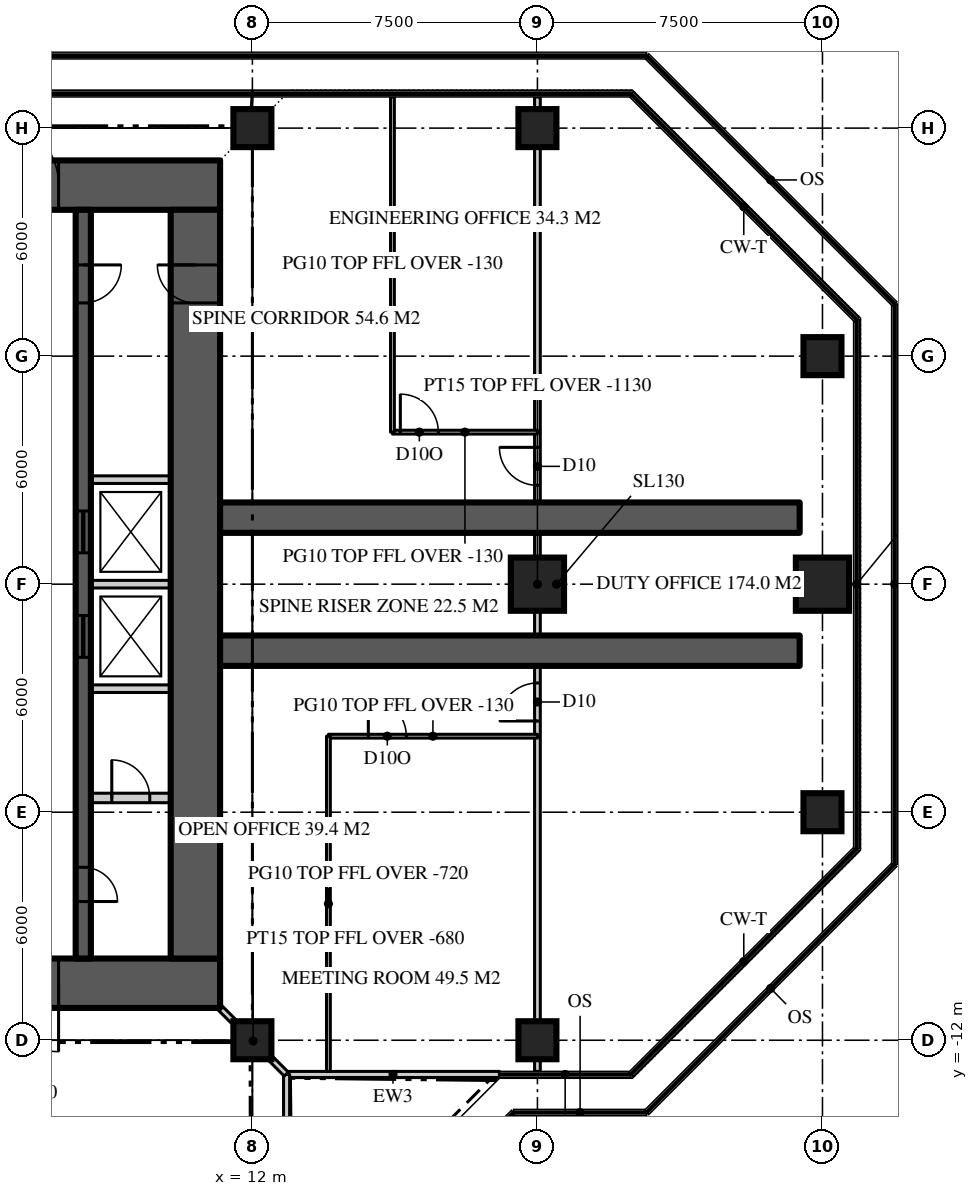
"""IFC4 building model, lengths in metres.
Left out: names, types, materials, properties, quantities, classifications, styles, units other than length and angle.
Written with IfcOpenShell. Run it as: python <this file> out.ifc"""

import sys

from ifc_helpers import new_model, si_unit, direction, frame, frame_2d, origin, origin_2d, place, context, subcontext, project, spatial, rectangle, extrude, element, fill, save


model = new_model("IFC4")
c1 = context("Model", 3, precision=1e-05, world=origin(), true_north=direction((0.0, 1.0)))
c2 = subcontext(c1, "Body", "Model", "MODEL_VIEW")
j1 = project(units=[si_unit("LENGTHUNIT", "METRE"), si_unit("PLANEANGLEUNIT", "RADIAN")], contexts=[c1])
p1 = place(None, origin())
s1 = spatial("IfcSite", under=j1, at=p1, CompositionType="ELEMENT")
p2 = place(p1, origin())
s2 = spatial("IfcBuilding", under=s1, at=p2, CompositionType="ELEMENT")
p3 = place(p2, frame((0.0, 0.0, 275.1)))
s3 = spatial("IfcBuildingStorey", under=s2, at=p3, CompositionType="ELEMENT", Elevation=275.1)
p4 = place(p3, frame((-11.15, 10.5, 0.0), z_axis=(0.0, 0.0, 1.0), x_axis=(1.0, 0.0, 0.0)))
e1 = element("IfcWall", 1, at=p4, inside=s3, PredefinedType="SHEAR", context=c2, shape_type="SweptSolid", body=[
    extrude(rectangle(XDim=22.3, YDim=1.3, at=frame_2d((11.15, 0.0))), origin(), (0.0, 0.0, 1.0), 3.9),
])
p5 = place(p4, frame((4.25, 0.0, 0.0)))
e2 = element("IfcOpeningElement", 2, at=p5, cuts=e1, PredefinedType="OPENING", context=c2, shape_type="SweptSolid", body=[
    extrude(rectangle(XDim=1.8, YDim=2.2, at=frame_2d((0.9, 1.1))), frame((0.0, 0.66, 0.0), z_axis=(0.0, -1.0, 0.0), x_axis=(1.0, 0.0, 0.0)), (0.0, 0.0, 1.0), 1.32),
])
p6 = place(p4, frame((16.25, 0.0, 0.0)))
e3 = element("IfcOpeningElement", 3, at=p6, cuts=e1, PredefinedType="OPENING", context=c2, shape_type="SweptSolid", body=[
    extrude(rectangle(XDim=1.8, YDim=2.2, at=frame_2d((0.9, 1.1))), frame((0.0, 0.66, 0.0), z_axis=(0.0, -1.0, 0.0), x_axis=(1.0, 0.0, 0.0)), (0.0, 0.0, 1.0), 1.32),
])
p7 = place(p3, frame((11.15, -10.5, 0.0), z_axis=(0.0, 0.0, 1.0), x_axis=(-1.0, 0.0, 0.0)))
e4 = element("IfcWall", 4, at=p7, inside=s3, PredefinedType="SHEAR", context=c2, shape_type="SweptSolid", body=[
    extrude(rectangle(XDim=22.3, YDim=1.3, at=frame_2d((11.15, 0.0))), origin(), (0.0, 0.0, 1.0), 3.9),
])
p8 = place(p7, frame((16.25, 0.0, 0.0)))
e5 = element("IfcOpeningElement", 5, at=p8, cuts=e4, PredefinedType="OPENING", context=c2, shape_type="SweptSolid", body=[
    extrude(rectangle(XDim=1.8, YDim=2.2, at=frame_2d((0.9, 1.1))), frame((0.0, 0.66, 0.0), z_axis=(0.0, -1.0, 0.0), x_axis=(1.0, 0.0, 0.0)), (0.0, 0.0, 1.0), 1.32),
])
p9 = place(p7, frame((4.25, 0.0, 0.0)))
e6 = element("IfcOpeningElement", 6, at=p9, cuts=e4, PredefinedType="OPENING", context=c2, shape_type="SweptSolid", body=[
    extrude(rectangle(XDim=1.8, YDim=2.2, at=frame_2d((0.9, 1.1))), frame((0.0, 0.66, 0.0), z_axis=(0.0, -1.0, 0.0), x_axis=(1.0, 0.0, 0.0)), (0.0, 0.0, 1.0), 1.32),
])
p10 = place(p3, frame((10.5, -9.85, 0.0), z_axis=(0.0, 0.0, 1.0), x_axis=(0.0, 1.0, 0.0)))
e7 = element("IfcWall", 7, at=p10, inside=s3, PredefinedType="SHEAR", context=c2, shape_type="SweptSolid", body=[
    extrude(rectangle(XDim=19.7, YDim=1.3, at=frame_2d((9.85, 0.0))), origin(), (0.0, 0.0, 1.0), 3.9),
])
p11 = place(p10, frame((17.25, 0.0, 0.0)))
e8 = element("IfcOpeningElement", 8, at=p11, cuts=e7, PredefinedType="OPENING", context=c2, shape_type="SweptSolid", body=[
    extrude(rectangle(XDim=1.0, YDim=2.2, at=frame_2d((0.5, 1.1))), frame((0.0, 0.66, 0.0), z_axis=(0.0, -1.0, 0.0), x_axis=(1.0, 0.0, 0.0)), (0.0, 0.0, 1.0), 1.32),
])
for number, where, z_axis, x_axis in (
    (9, (11.15, -1.75, 0.0), (0.0, 0.0, 1.0), (1.0, 0.0, 0.0)),
    (10, (11.15, 1.75, 0.0), (0.0, 0.0, 1.0), (1.0, 0.0, 0.0)),
):
    element("IfcWall", number, at=place(p3, frame(where, z_axis=z_axis, x_axis=x_axis)), inside=s3, PredefinedType="SHEAR", context=c2, shape_type="SweptSolid", body=[
        extrude(rectangle(XDim=15.25, YDim=0.8, at=frame_2d((7.625, 0.0))), origin(), (0.0, 0.0, 1.0), 3.9),
    ])
for number, where, z_axis, x_axis in (
    (11, (12.0, -12.0, 0.0), (0.0, 0.0, 1.0), (1.0, 0.0, 0.0)),
    (12, (19.5, -12.0, 0.0), (0.0, 0.0, 1.0), (1.0, 0.0, 0.0)),
    (13, (27.0, -6.0, 0.0), (0.0, 0.0, 1.0), (1.0, 0.0, 0.0)),
):
    element("IfcColumn", number, at=place(p3, frame(where, z_axis=z_axis, x_axis=x_axis)), inside=s3, PredefinedType="COLUMN", context=c2, shape_type="SweptSolid", body=[
        extrude(rectangle(XDim=1.0, YDim=1.0, at=origin_2d()), origin(), (0.0, 0.0, 1.0), 3.9),
    ])
for number, where, z_axis, x_axis in (
    (14, (19.5, 0.0, 0.0), (0.0, 0.0, 1.0), (1.0, 0.0, 0.0)),
    (15, (27.0, 0.0, 0.0), (0.0, 0.0, 1.0), (1.0, 0.0, 0.0)),
):
    element("IfcColumn", number, at=place(p3, frame(where, z_axis=z_axis, x_axis=x_axis)), inside=s3, PredefinedType="COLUMN", context=c2, shape_type="SweptSolid", body=[
        extrude(rectangle(XDim=1.4, YDim=1.4, at=origin_2d()), origin(), (0.0, 0.0, 1.0), 3.9),
    ])
for number, where, z_axis, x_axis in (
    (16, (27.0, 6.0, 0.0), (0.0, 0.0, 1.0), (1.0, 0.0, 0.0)),
    (17, (12.0, 12.0, 0.0), (0.0, 0.0, 1.0), (1.0, 0.0, 0.0)),
    (18, (19.5, 12.0, 0.0), (0.0, 0.0, 1.0), (1.0, 0.0, 0.0)),
):
    element("IfcColumn", number, at=place(p3, frame(where, z_axis=z_axis, x_axis=x_axis)), inside=s3, PredefinedType="COLUMN", context=c2, shape_type="SweptSolid", body=[
        extrude(rectangle(XDim=1.0, YDim=1.0, at=origin_2d()), origin(), (0.0, 0.0, 1.0), 3.9),
    ])
p12 = place(p3, frame((12.9, -12.9, 0.0), z_axis=(0.0, 0.0, 1.0), x_axis=(1.0, 0.0, 0.0)))
e19 = element("IfcWall", 19, at=p12, inside=s3, PredefinedType="SOLIDWALL", context=c2, shape_type="SweptSolid", body=[
    extrude(rectangle(XDim=5.6, YDim=0.16, at=frame_2d((2.8, 0.0))), origin(), (0.0, 0.0, 1.0), 3.77),
])
p13 = place(p3, frame((12.9, -18.5, 0.0), z_axis=(0.0, 0.0, 1.0), x_axis=(0.0, 1.0, 0.0)))
e20 = element("IfcWall", 20, at=p13, inside=s3, PredefinedType="SOLIDWALL", context=c2, shape_type="SweptSolid", body=[
    extrude(rectangle(XDim=5.6, YDim=0.16, at=frame_2d((2.8, 0.0))), origin(), (0.0, 0.0, 1.0), 3.77),
])
p14 = place(p13, frame((2.3, 0.0, 0.0)))
e21 = element("IfcOpeningElement", 21, at=p14, cuts=e20, PredefinedType="OPENING", context=c2, shape_type="SweptSolid", body=[
    extrude(rectangle(XDim=1.0, YDim=2.2, at=frame_2d((0.5, 1.1))), frame((0.0, 0.09, 0.0), z_axis=(0.0, -1.0, 0.0), x_axis=(1.0, 0.0, 0.0)), (0.0, 0.0, 1.0), 0.18),
])
p15 = place(p3, frame((7.55, 9.85, 0.0), z_axis=(0.0, 0.0, 1.0), x_axis=(0.0, -1.0, 0.0)))
e22 = element("IfcWall", 22, at=p15, inside=s3, PredefinedType="SHEAR", context=c2, shape_type="SweptSolid", body=[
    extrude(rectangle(XDim=19.7, YDim=0.4, at=frame_2d((9.85, 0.0))), origin(), (0.0, 0.0, 1.0), 3.9),
])
p16 = place(p15, frame((1.45, 0.0, 0.0)))
e23 = element("IfcOpeningElement", 23, at=p16, cuts=e22, PredefinedType="OPENING", context=c2, shape_type="SweptSolid", body=[
    extrude(rectangle(XDim=1.0, YDim=2.2, at=frame_2d((0.5, 1.1))), frame((0.0, 0.21, 0.0), z_axis=(0.0, -1.0, 0.0), x_axis=(1.0, 0.0, 0.0)), (0.0, 0.0, 1.0), 0.42),
])
p17 = place(p15, frame((17.3, 0.0, 0.0)))
e24 = element("IfcOpeningElement", 24, at=p17, cuts=e22, PredefinedType="OPENING", context=c2, shape_type="SweptSolid", body=[
    extrude(rectangle(XDim=0.9, YDim=2.1, at=frame_2d((0.45, 1.05))), frame((0.0, 0.21, 0.0), z_axis=(0.0, -1.0, 0.0), x_axis=(1.0, 0.0, 0.0)), (0.0, 0.0, 1.0), 0.42),
])
p18 = place(p15, frame((7.925, 0.0, 0.0)))
e25 = element("IfcOpeningElement", 25, at=p18, cuts=e22, PredefinedType="OPENING", context=c2, shape_type="SweptSolid", body=[
    extrude(rectangle(XDim=1.1, YDim=2.2, at=frame_2d((0.55, 1.1))), frame((0.0, 0.21, 0.0), z_axis=(0.0, -1.0, 0.0), x_axis=(1.0, 0.0, 0.0)), (0.0, 0.0, 1.0), 0.42),
])
p19 = place(p15, frame((10.675, 0.0, 0.0)))
e26 = element("IfcOpeningElement", 26, at=p19, cuts=e22, PredefinedType="OPENING", context=c2, shape_type="SweptSolid", body=[
    extrude(rectangle(XDim=1.1, YDim=2.2, at=frame_2d((0.55, 1.1))), frame((0.0, 0.21, 0.0), z_axis=(0.0, -1.0, 0.0), x_axis=(1.0, 0.0, 0.0)), (0.0, 0.0, 1.0), 0.42),
])
p20 = place(p3, frame((7.75, -5.625, 0.0), z_axis=(0.0, 0.0, 1.0), x_axis=(1.0, 0.0, 0.0)))
e27 = element("IfcWall", 27, at=p20, inside=s3, PredefinedType="SOLIDWALL", context=c2, shape_type="SweptSolid", body=[
    extrude(rectangle(XDim=2.1, YDim=0.25, at=frame_2d((1.05, 0.0))), origin(), (0.0, 0.0, 1.0), 3.7),
])
p21 = place(p20, frame((0.55, 0.0, 0.0)))
e28 = element("IfcOpeningElement", 28, at=p21, cuts=e27, PredefinedType="OPENING", context=c2, shape_type="SweptSolid", body=[
    extrude(rectangle(XDim=1.0, YDim=2.2, at=frame_2d((0.5, 1.1))), frame((0.0, 0.135, 0.0), z_axis=(0.0, -1.0, 0.0), x_axis=(1.0, 0.0, 0.0)), (0.0, 0.0, 1.0), 0.27),
])
for number, where, z_axis, x_axis in (
    (29, (7.75, -2.75, 0.0), (0.0, 0.0, 1.0), (1.0, 0.0, 0.0)),
    (30, (7.75, 0.0, 0.0), (0.0, 0.0, 1.0), (1.0, 0.0, 0.0)),
    (31, (7.75, 2.75, 0.0), (0.0, 0.0, 1.0), (1.0, 0.0, 0.0)),
):
    element("IfcWall", number, at=place(p3, frame(where, z_axis=z_axis, x_axis=x_axis)), inside=s3, PredefinedType="SOLIDWALL", context=c2, shape_type="SweptSolid", body=[
        extrude(rectangle(XDim=2.1, YDim=0.2, at=frame_2d((1.05, 0.0))), origin(), (0.0, 0.0, 1.0), 3.7),
    ])
p22 = place(p3, frame((19.5, -12.82, 0.0), z_axis=(0.0, 0.0, 1.0), x_axis=(0.0, 1.0, 0.0)))
e32 = element("IfcWall", 32, at=p22, inside=s3, PredefinedType="PARTITIONING", context=c2, shape_type="SweptSolid", body=[
    extrude(rectangle(XDim=25.64, YDim=0.15, at=frame_2d((12.82, 0.0))), origin(), (0.0, 0.0, 1.0), 2.77),
])
p23 = place(p22, frame((15.42, 0.0, 0.0)))
e33 = element("IfcOpeningElement", 33, at=p23, cuts=e32, PredefinedType="OPENING", context=c2, shape_type="SweptSolid", body=[
    extrude(rectangle(XDim=1.0, YDim=2.2, at=frame_2d((0.5, 1.1))), frame((0.0, 0.085, 0.0), z_axis=(0.0, -1.0, 0.0), x_axis=(1.0, 0.0, 0.0)), (0.0, 0.0, 1.0), 0.17),
])
p24 = place(p22, frame((9.22, 0.0, 0.0)))
e34 = element("IfcOpeningElement", 34, at=p24, cuts=e32, PredefinedType="OPENING", context=c2, shape_type="SweptSolid", body=[
    extrude(rectangle(XDim=1.0, YDim=2.2, at=frame_2d((0.5, 1.1))), frame((0.0, 0.085, 0.0), z_axis=(0.0, -1.0, 0.0), x_axis=(1.0, 0.0, 0.0)), (0.0, 0.0, 1.0), 0.17),
])
p25 = place(p3, frame((15.685, 4.0, 0.0), z_axis=(0.0, 0.0, 1.0), x_axis=(1.0, 0.0, 0.0)))
e35 = element("IfcWall", 35, at=p25, inside=s3, PredefinedType="PARTITIONING", context=c2, shape_type="SweptSolid", body=[
    extrude(rectangle(XDim=3.815, YDim=0.1, at=frame_2d((1.907, 0.0))), origin(), (0.0, 0.0, 1.0), 3.77),
])
p26 = place(p25, frame((0.208, 0.0, 0.0)))
e36 = element("IfcOpeningElement", 36, at=p26, cuts=e35, PredefinedType="OPENING", context=c2, shape_type="SweptSolid", body=[
    extrude(rectangle(XDim=1.0, YDim=2.2, at=frame_2d((0.5, 1.1))), frame((0.0, 0.06, 0.0), z_axis=(0.0, -1.0, 0.0), x_axis=(1.0, 0.0, 0.0)), (0.0, 0.0, 1.0), 0.12),
])
p27 = place(p3, frame((15.685, 4.0, 0.0), z_axis=(0.0, 0.0, 1.0), x_axis=(0.0, 1.0, 0.0)))
e37 = element("IfcWall", 37, at=p27, inside=s3, PredefinedType="PARTITIONING", context=c2, shape_type="SweptSolid", body=[
    extrude(rectangle(XDim=8.82, YDim=0.1, at=frame_2d((4.41, 0.0))), origin(), (0.0, 0.0, 1.0), 3.77),
])
p28 = place(p3, frame((14.0, -4.0, 0.0), z_axis=(0.0, 0.0, 1.0), x_axis=(1.0, 0.0, 0.0)))
e38 = element("IfcWall", 38, at=p28, inside=s3, PredefinedType="PARTITIONING", context=c2, shape_type="SweptSolid", body=[
    extrude(rectangle(XDim=5.5, YDim=0.1, at=frame_2d((2.75, 0.0))), origin(), (0.0, 0.0, 1.0), 3.77),
])
p29 = place(p28, frame((1.05, 0.0, 0.0)))
e39 = element("IfcOpeningElement", 39, at=p29, cuts=e38, PredefinedType="OPENING", context=c2, shape_type="SweptSolid", body=[
    extrude(rectangle(XDim=1.0, YDim=2.2, at=frame_2d((0.5, 1.1))), frame((0.0, 0.06, 0.0), z_axis=(0.0, -1.0, 0.0), x_axis=(1.0, 0.0, 0.0)), (0.0, 0.0, 1.0), 0.12),
])
p30 = place(p3, frame((14.0, -4.0, 0.0), z_axis=(0.0, 0.0, 1.0), x_axis=(0.0, -1.0, 0.0)))
e40 = element("IfcWall", 40, at=p30, inside=s3, PredefinedType="PARTITIONING", context=c2, shape_type="SweptSolid", body=[
    extrude(rectangle(XDim=8.82, YDim=0.1, at=frame_2d((4.41, 0.0))), origin(), (0.0, 0.0, 1.0), 3.18),
])
p31 = place(p3, frame((11.15, -11.15, 0.0), z_axis=(0.0, 0.0, 1.0), x_axis=(0.707106781187, -0.707106781187, 0.0)))
e41 = element("IfcWall", 41, at=p31, inside=s3, PredefinedType="PARTITIONING", context=c2, shape_type="SweptSolid", body=[
    extrude(rectangle(XDim=2.461, YDim=0.15, at=frame_2d((1.23, 0.0))), origin(), (0.0, 0.0, 1.0), 3.22),
])
p32 = place(p6, origin())
e42 = element("IfcDoor", 42, at=p32, inside=s3, OperationType="DOUBLE_DOOR_DOUBLE_SWING", PredefinedType="DOOR", context=c2, shape_type="SweptSolid", body=[
    extrude(rectangle(XDim=1.8, YDim=2.2, at=frame_2d((0.9, 1.1))), frame((0.0, 0.025, 0.0), z_axis=(0.0, -1.0, 0.0), x_axis=(1.0, 0.0, 0.0)), (0.0, 0.0, 1.0), 0.05),
])
fill(e3, e42)
p33 = place(p9, origin())
e43 = element("IfcDoor", 43, at=p33, inside=s3, OperationType="DOUBLE_DOOR_DOUBLE_SWING", PredefinedType="DOOR", context=c2, shape_type="SweptSolid", body=[
    extrude(rectangle(XDim=1.8, YDim=2.2, at=frame_2d((0.9, 1.1))), frame((0.0, 0.025, 0.0), z_axis=(0.0, -1.0, 0.0), x_axis=(1.0, 0.0, 0.0)), (0.0, 0.0, 1.0), 0.05),
])
fill(e6, e43)
p34 = place(p16, origin())
e44 = element("IfcDoor", 44, at=p34, inside=s3, OperationType="SINGLE_SWING_LEFT", PredefinedType="DOOR", context=c2, shape_type="SweptSolid", body=[
    extrude(rectangle(XDim=1.0, YDim=2.2, at=frame_2d((0.5, 1.1))), frame((0.0, 0.025, 0.0), z_axis=(0.0, -1.0, 0.0), x_axis=(1.0, 0.0, 0.0)), (0.0, 0.0, 1.0), 0.05),
])
fill(e23, e44)
p35 = place(p11, origin())
e45 = element("IfcDoor", 45, at=p35, inside=s3, OperationType="SINGLE_SWING_RIGHT", PredefinedType="DOOR", context=c2, shape_type="SweptSolid", body=[
    extrude(rectangle(XDim=1.0, YDim=2.2, at=frame_2d((0.5, 1.1))), frame((0.0, 0.025, 0.0), z_axis=(0.0, -1.0, 0.0), x_axis=(1.0, 0.0, 0.0)), (0.0, 0.0, 1.0), 0.05),
])
fill(e8, e45)
p36 = place(p17, origin())
e46 = element("IfcDoor", 46, at=p36, inside=s3, OperationType="SINGLE_SWING_RIGHT", PredefinedType="DOOR", context=c2, shape_type="SweptSolid", body=[
    extrude(rectangle(XDim=0.9, YDim=2.1, at=frame_2d((0.45, 1.05))), frame((0.0, 0.025, 0.0), z_axis=(0.0, -1.0, 0.0), x_axis=(1.0, 0.0, 0.0)), (0.0, 0.0, 1.0), 0.05),
])
fill(e24, e46)
p37 = place(p18, origin())
e47 = element("IfcDoor", 47, at=p37, inside=s3, OperationType="SLIDING_TO_LEFT", PredefinedType="DOOR", context=c2, shape_type="SweptSolid", body=[
    extrude(rectangle(XDim=1.1, YDim=2.2, at=frame_2d((0.55, 1.1))), frame((0.0, 0.025, 0.0), z_axis=(0.0, -1.0, 0.0), x_axis=(1.0, 0.0, 0.0)), (0.0, 0.0, 1.0), 0.05),
])
fill(e25, e47)
p38 = place(p19, origin())
e48 = element("IfcDoor", 48, at=p38, inside=s3, OperationType="SLIDING_TO_LEFT", PredefinedType="DOOR", context=c2, shape_type="SweptSolid", body=[
    extrude(rectangle(XDim=1.1, YDim=2.2, at=frame_2d((0.55, 1.1))), frame((0.0, 0.025, 0.0), z_axis=(0.0, -1.0, 0.0), x_axis=(1.0, 0.0, 0.0)), (0.0, 0.0, 1.0), 0.05),
])
fill(e26, e48)
p39 = place(p23, origin())
e49 = element("IfcDoor", 49, at=p39, inside=s3, OperationType="SINGLE_SWING_RIGHT", PredefinedType="DOOR", context=c2, shape_type="SweptSolid", body=[
    extrude(rectangle(XDim=1.0, YDim=2.2, at=frame_2d((0.5, 1.1))), frame((0.0, 0.025, 0.0), z_axis=(0.0, -1.0, 0.0), x_axis=(1.0, 0.0, 0.0)), (0.0, 0.0, 1.0), 0.05),
])
fill(e33, e49)
p40 = place(p24, origin())
e50 = element("IfcDoor", 50, at=p40, inside=s3, OperationType="SINGLE_SWING_LEFT", PredefinedType="DOOR", context=c2, shape_type="SweptSolid", body=[
    extrude(rectangle(XDim=1.0, YDim=2.2, at=frame_2d((0.5, 1.1))), frame((0.0, 0.025, 0.0), z_axis=(0.0, -1.0, 0.0), x_axis=(1.0, 0.0, 0.0)), (0.0, 0.0, 1.0), 0.05),
])
fill(e34, e50)
p41 = place(p26, origin())
e51 = element("IfcDoor", 51, at=p41, inside=s3, OperationType="SINGLE_SWING_LEFT", PredefinedType="DOOR", context=c2, shape_type="SweptSolid", body=[
    extrude(rectangle(XDim=1.0, YDim=2.2, at=frame_2d((0.5, 1.1))), frame((0.0, 0.025, 0.0), z_axis=(0.0, -1.0, 0.0), x_axis=(1.0, 0.0, 0.0)), (0.0, 0.0, 1.0), 0.05),
])
fill(e36, e51)
p42 = place(p29, origin())
e52 = element("IfcDoor", 52, at=p42, inside=s3, OperationType="SINGLE_SWING_LEFT", PredefinedType="DOOR", context=c2, shape_type="SweptSolid", body=[
    extrude(rectangle(XDim=1.0, YDim=2.2, at=frame_2d((0.5, 1.1))), frame((0.0, 0.025, 0.0), z_axis=(0.0, -1.0, 0.0), x_axis=(1.0, 0.0, 0.0)), (0.0, 0.0, 1.0), 0.05),
])
fill(e39, e52)
p43 = place(p21, origin())
e53 = element("IfcDoor", 53, at=p43, inside=s3, OperationType="SINGLE_SWING_LEFT", PredefinedType="DOOR", context=c2, shape_type="SweptSolid", body=[
    extrude(rectangle(XDim=1.0, YDim=2.2, at=frame_2d((0.5, 1.1))), frame((0.0, 0.025, 0.0), z_axis=(0.0, -1.0, 0.0), x_axis=(1.0, 0.0, 0.0)), (0.0, 0.0, 1.0), 0.05),
])
fill(e28, e53)
save(model, sys.argv[1])
